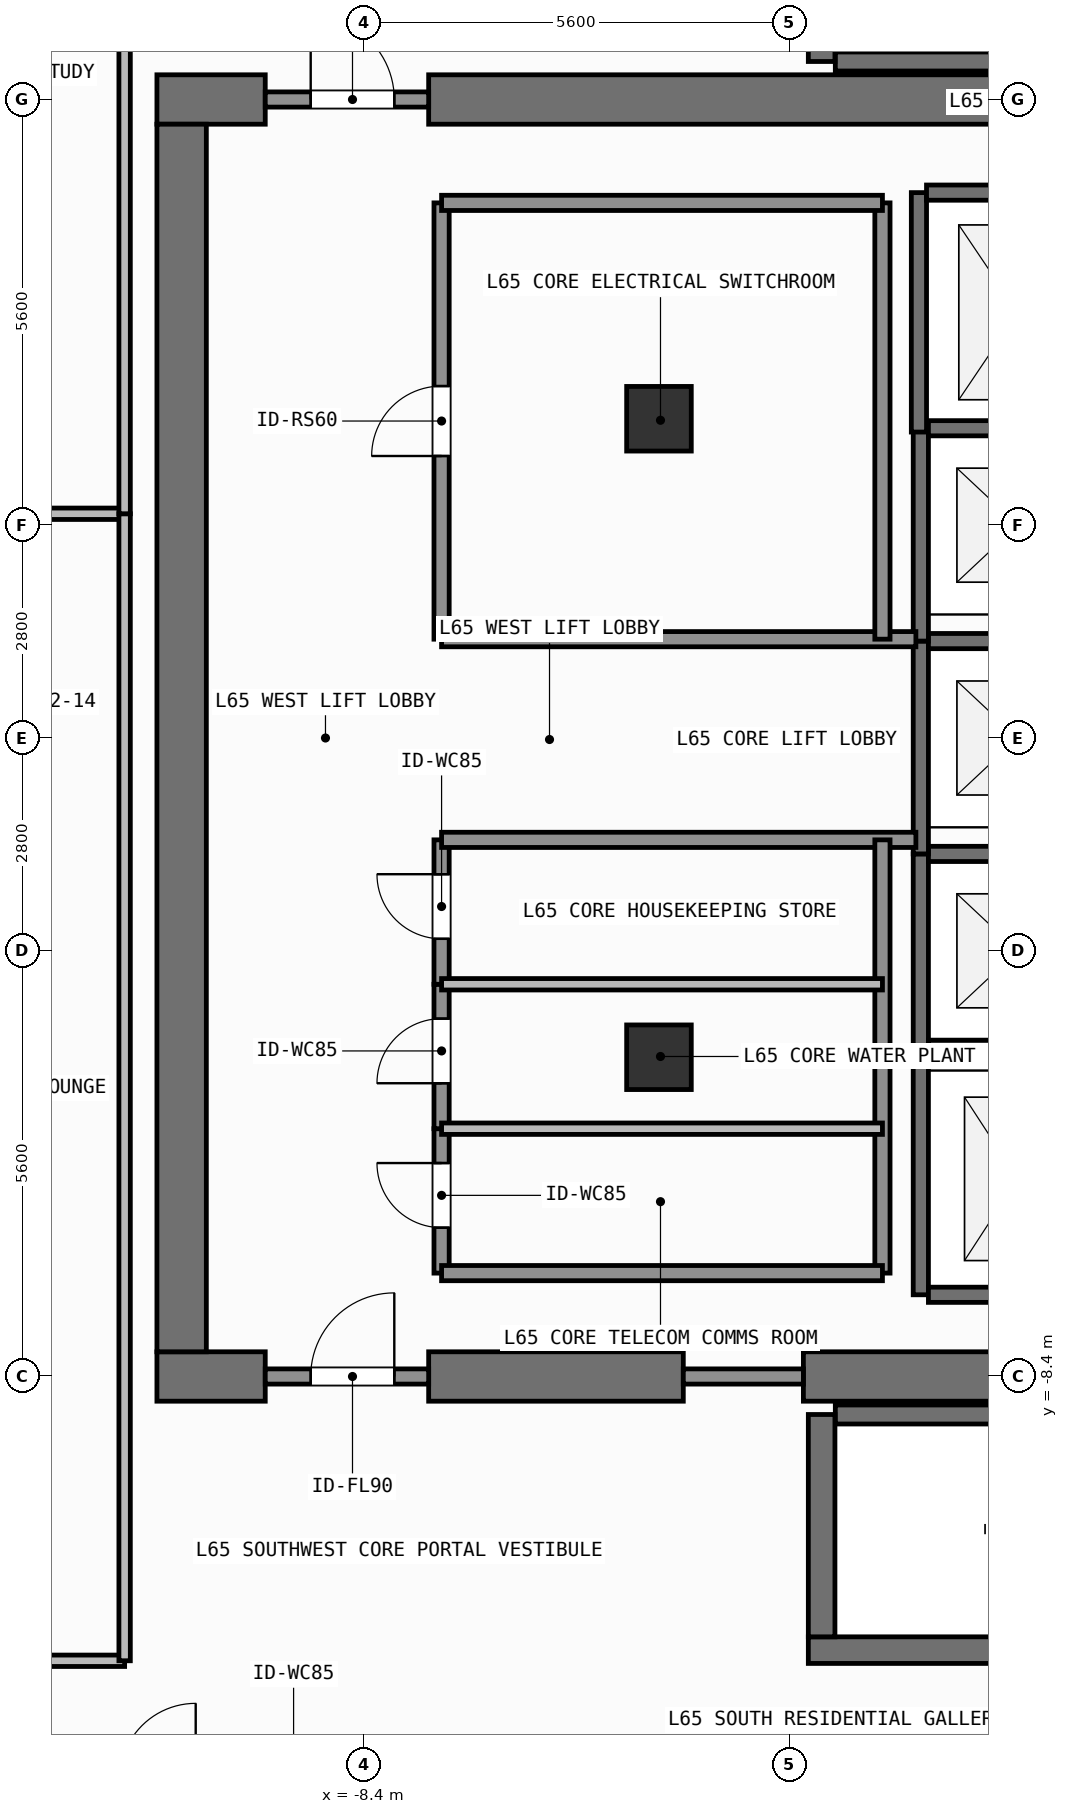
"""IFC4 building model, lengths in metres.
Left out: names, types, materials, properties, quantities, classifications, styles, units other than length and angle.
Written with IfcOpenShell. Run it as: python <this file> out.ifc"""

import sys

from ifc_helpers import new_model, si_unit, direction, frame, frame_2d, origin, origin_2d, place, context, subcontext, project, spatial, rectangle, extrude, element, fill, save


model = new_model("IFC4")
c1 = context("Model", 3, precision=1e-05, world=origin(), true_north=direction((0.0, 1.0)))
c2 = subcontext(c1, "Body", "Model", "MODEL_VIEW")
j1 = project(units=[si_unit("LENGTHUNIT", "METRE"), si_unit("PLANEANGLEUNIT", "RADIAN")], contexts=[c1])
p1 = place(None, origin())
s1 = spatial("IfcSite", under=j1, at=p1, CompositionType="ELEMENT")
p2 = place(p1, origin())
s2 = spatial("IfcBuilding", under=s1, at=p2, CompositionType="ELEMENT")
p3 = place(p2, frame((0.0, 0.0, 266.4)))
s3 = spatial("IfcBuildingStorey", under=s2, at=p3, CompositionType="ELEMENT", Elevation=266.4)
p4 = place(p3, frame((-11.125, -8.4, 0.0), z_axis=(0.0, 0.0, 1.0), x_axis=(1.0, 0.0, 0.0)))
e1 = element("IfcWall", 1, at=p4, inside=s3, PredefinedType="SHEAR", context=c2, shape_type="SweptSolid", body=[
    extrude(rectangle(XDim=1.425, YDim=0.65, at=frame_2d((0.712, 0.0))), origin(), (0.0, 0.0, 1.0), 3.9),
])
p5 = place(p3, frame((-7.55, -8.4, 0.0), z_axis=(0.0, 0.0, 1.0), x_axis=(1.0, 0.0, 0.0)))
e2 = element("IfcWall", 2, at=p5, inside=s3, PredefinedType="SHEAR", context=c2, shape_type="SweptSolid", body=[
    extrude(rectangle(XDim=3.35, YDim=0.65, at=frame_2d((1.675, 0.0))), origin(), (0.0, 0.0, 1.0), 3.9),
])
p6 = place(p3, frame((-2.62, -8.4, 0.0), z_axis=(0.0, 0.0, 1.0), x_axis=(1.0, 0.0, 0.0)))
e3 = element("IfcWall", 3, at=p6, inside=s3, PredefinedType="SHEAR", context=c2, shape_type="SweptSolid", body=[
    extrude(rectangle(XDim=7.27, YDim=0.65, at=frame_2d((3.635, 0.0))), origin(), (0.0, 0.0, 1.0), 3.9),
])
p7 = place(p3, frame((-11.125, 8.4, 0.0), z_axis=(0.0, 0.0, 1.0), x_axis=(1.0, 0.0, 0.0)))
e4 = element("IfcWall", 4, at=p7, inside=s3, PredefinedType="SHEAR", context=c2, shape_type="SweptSolid", body=[
    extrude(rectangle(XDim=1.425, YDim=0.65, at=frame_2d((0.712, 0.0))), origin(), (0.0, 0.0, 1.0), 3.9),
])
p8 = place(p3, frame((-7.55, 8.4, 0.0), z_axis=(0.0, 0.0, 1.0), x_axis=(1.0, 0.0, 0.0)))
e5 = element("IfcWall", 5, at=p8, inside=s3, PredefinedType="SHEAR", context=c2, shape_type="SweptSolid", body=[
    extrude(rectangle(XDim=16.275, YDim=0.65, at=frame_2d((8.138, 0.0))), origin(), (0.0, 0.0, 1.0), 3.9),
])
p9 = place(p3, frame((-10.8, -8.075, 0.0), z_axis=(0.0, 0.0, 1.0), x_axis=(0.0, 1.0, 0.0)))
e6 = element("IfcWall", 6, at=p9, inside=s3, PredefinedType="SHEAR", context=c2, shape_type="SweptSolid", body=[
    extrude(rectangle(XDim=16.15, YDim=0.65, at=frame_2d((8.075, 0.0))), origin(), (0.0, 0.0, 1.0), 3.9),
])
p10 = place(p3, frame((-2.555, -12.0, 0.0), z_axis=(0.0, 0.0, 1.0), x_axis=(1.0, 0.0, 0.0)))
e7 = element("IfcWall", 7, at=p10, inside=s3, PredefinedType="SHEAR", context=c2, shape_type="SweptSolid", body=[
    extrude(rectangle(XDim=7.31, YDim=0.35, at=frame_2d((3.655, 0.0))), origin(), (0.0, 0.0, 1.0), 3.9),
])
p11 = place(p3, frame((-2.2, -8.9, 0.0), z_axis=(0.0, 0.0, 1.0), x_axis=(1.0, 0.0, 0.0)))
e8 = element("IfcWall", 8, at=p11, inside=s3, PredefinedType="SHEAR", context=c2, shape_type="SweptSolid", body=[
    extrude(rectangle(XDim=6.6, YDim=0.25, at=frame_2d((3.3, 0.0))), origin(), (0.0, 0.0, 1.0), 3.9),
])
p12 = place(p3, frame((-2.38, -11.825, 0.0), z_axis=(0.0, 0.0, 1.0), x_axis=(0.0, 1.0, 0.0)))
e9 = element("IfcWall", 9, at=p12, inside=s3, PredefinedType="SHEAR", context=c2, shape_type="SweptSolid", body=[
    extrude(rectangle(XDim=2.925, YDim=0.35, at=frame_2d((1.462, 0.0))), origin(), (0.0, 0.0, 1.0), 3.9),
])
p13 = place(p3, frame((-2.2, 8.9, 0.0), z_axis=(0.0, 0.0, 1.0), x_axis=(1.0, 0.0, 0.0)))
e10 = element("IfcWall", 10, at=p13, inside=s3, PredefinedType="SHEAR", context=c2, shape_type="SweptSolid", body=[
    extrude(rectangle(XDim=6.6, YDim=0.25, at=frame_2d((3.3, 0.0))), origin(), (0.0, 0.0, 1.0), 3.9),
])
p14 = place(p3, frame((-2.38, 8.9, 0.0), z_axis=(0.0, 0.0, 1.0), x_axis=(0.0, 1.0, 0.0)))
e11 = element("IfcWall", 11, at=p14, inside=s3, PredefinedType="SHEAR", context=c2, shape_type="SweptSolid", body=[
    extrude(rectangle(XDim=2.925, YDim=0.35, at=frame_2d((1.462, 0.0))), origin(), (0.0, 0.0, 1.0), 3.9),
])
for number, where, z_axis, x_axis in (
    (12, (-4.52, -4.2, 0.0), (0.0, 0.0, 1.0), (1.0, 0.0, 0.0)),
    (13, (-4.52, 4.2, 0.0), (0.0, 0.0, 1.0), (1.0, 0.0, 0.0)),
):
    element("IfcColumn", number, at=place(p3, frame(where, z_axis=z_axis, x_axis=x_axis)), inside=s3, PredefinedType="COLUMN", context=c2, shape_type="SweptSolid", body=[
        extrude(rectangle(XDim=0.85, YDim=0.85, at=origin_2d()), origin(), (0.0, 0.0, 1.0), 3.9),
    ])
p15 = place(p3, frame((-1.075, -4.275, 0.0), z_axis=(0.0, 0.0, 1.0), x_axis=(0.0, 1.0, 0.0)))
e14 = element("IfcWall", 14, at=p15, inside=s3, PredefinedType="SHEAR", context=c2, shape_type="SweptSolid", body=[
    extrude(rectangle(XDim=2.75, YDim=0.2, at=frame_2d((1.375, 0.0))), origin(), (0.0, 0.0, 1.0), 3.68),
])
for number, where, z_axis, x_axis in (
    (15, (-0.975, -4.075, 0.0), (0.0, 0.0, 1.0), (1.0, 0.0, 0.0)),
    (16, (-0.975, -1.525, 0.0), (0.0, 0.0, 1.0), (1.0, 0.0, 0.0)),
):
    element("IfcWall", number, at=place(p3, frame(where, z_axis=z_axis, x_axis=x_axis)), inside=s3, PredefinedType="SHEAR", context=c2, shape_type="SweptSolid", body=[
        extrude(rectangle(XDim=2.35, YDim=0.2, at=frame_2d((1.175, 0.0))), origin(), (0.0, 0.0, 1.0), 3.68),
    ])
p16 = place(p3, frame((-1.075, -1.525, 0.0), z_axis=(0.0, 0.0, 1.0), x_axis=(0.0, 1.0, 0.0)))
e17 = element("IfcWall", 17, at=p16, inside=s3, PredefinedType="SHEAR", context=c2, shape_type="SweptSolid", body=[
    extrude(rectangle(XDim=2.8, YDim=0.2, at=frame_2d((1.4, 0.0))), origin(), (0.0, 0.0, 1.0), 3.68),
])
p17 = place(p3, frame((-0.975, 1.275, 0.0), z_axis=(0.0, 0.0, 1.0), x_axis=(1.0, 0.0, 0.0)))
e18 = element("IfcWall", 18, at=p17, inside=s3, PredefinedType="SHEAR", context=c2, shape_type="SweptSolid", body=[
    extrude(rectangle(XDim=2.35, YDim=0.2, at=frame_2d((1.175, 0.0))), origin(), (0.0, 0.0, 1.0), 3.68),
])
p18 = place(p3, frame((-1.075, 1.275, 0.0), z_axis=(0.0, 0.0, 1.0), x_axis=(0.0, 1.0, 0.0)))
e19 = element("IfcWall", 19, at=p18, inside=s3, PredefinedType="SHEAR", context=c2, shape_type="SweptSolid", body=[
    extrude(rectangle(XDim=2.8, YDim=0.2, at=frame_2d((1.4, 0.0))), origin(), (0.0, 0.0, 1.0), 3.68),
])
p19 = place(p3, frame((-0.975, 4.075, 0.0), z_axis=(0.0, 0.0, 1.0), x_axis=(1.0, 0.0, 0.0)))
e20 = element("IfcWall", 20, at=p19, inside=s3, PredefinedType="SHEAR", context=c2, shape_type="SweptSolid", body=[
    extrude(rectangle(XDim=2.35, YDim=0.2, at=frame_2d((1.175, 0.0))), origin(), (0.0, 0.0, 1.0), 3.68),
])
p20 = place(p3, frame((-1.1, 4.025, 0.0), z_axis=(0.0, 0.0, 1.0), x_axis=(0.0, 1.0, 0.0)))
e21 = element("IfcWall", 21, at=p20, inside=s3, PredefinedType="SHEAR", context=c2, shape_type="SweptSolid", body=[
    extrude(rectangle(XDim=3.15, YDim=0.2, at=frame_2d((1.575, 0.0))), origin(), (0.0, 0.0, 1.0), 3.68),
])
p21 = place(p3, frame((-1.0, 7.175, 0.0), z_axis=(0.0, 0.0, 1.0), x_axis=(1.0, 0.0, 0.0)))
e22 = element("IfcWall", 22, at=p21, inside=s3, PredefinedType="SHEAR", context=c2, shape_type="SweptSolid", body=[
    extrude(rectangle(XDim=2.4, YDim=0.2, at=frame_2d((1.2, 0.0))), origin(), (0.0, 0.0, 1.0), 3.68),
])
p22 = place(p3, frame((-1.075, -7.325, 0.0), z_axis=(0.0, 0.0, 1.0), x_axis=(0.0, 1.0, 0.0)))
e23 = element("IfcWall", 23, at=p22, inside=s3, PredefinedType="SHEAR", context=c2, shape_type="SweptSolid", body=[
    extrude(rectangle(XDim=3.05, YDim=0.2, at=frame_2d((1.525, 0.0))), origin(), (0.0, 0.0, 1.0), 3.68),
])
p23 = place(p3, frame((-0.975, -7.325, 0.0), z_axis=(0.0, 0.0, 1.0), x_axis=(1.0, 0.0, 0.0)))
e24 = element("IfcWall", 24, at=p23, inside=s3, PredefinedType="SHEAR", context=c2, shape_type="SweptSolid", body=[
    extrude(rectangle(XDim=2.35, YDim=0.2, at=frame_2d((1.175, 0.0))), origin(), (0.0, 0.0, 1.0), 3.68),
])
p24 = place(p3, frame((-9.7, -8.4, 0.0), z_axis=(0.0, 0.0, 1.0), x_axis=(1.0, 0.0, 0.0)))
e25 = element("IfcWall", 25, at=p24, inside=s3, PredefinedType="SOLIDWALL", context=c2, shape_type="SweptSolid", body=[
    extrude(rectangle(XDim=2.15, YDim=0.2, at=frame_2d((1.075, 0.0))), origin(), (0.0, 0.0, 1.0), 2.92),
])
p25 = place(p24, frame((0.598, 0.0, 0.0)))
e26 = element("IfcOpeningElement", 26, at=p25, cuts=e25, PredefinedType="OPENING", context=c2, shape_type="SweptSolid", body=[
    extrude(rectangle(XDim=1.1, YDim=2.15, at=frame_2d((0.55, 1.075))), frame((0.0, 0.11, 0.0), z_axis=(0.0, -1.0, 0.0), x_axis=(1.0, 0.0, 0.0)), (0.0, 0.0, 1.0), 0.22),
])
p26 = place(p3, frame((-9.7, 8.4, 0.0), z_axis=(0.0, 0.0, 1.0), x_axis=(1.0, 0.0, 0.0)))
e27 = element("IfcWall", 27, at=p26, inside=s3, PredefinedType="SOLIDWALL", context=c2, shape_type="SweptSolid", body=[
    extrude(rectangle(XDim=2.15, YDim=0.2, at=frame_2d((1.075, 0.0))), origin(), (0.0, 0.0, 1.0), 2.92),
])
p27 = place(p26, frame((0.598, 0.0, 0.0)))
e28 = element("IfcOpeningElement", 28, at=p27, cuts=e27, PredefinedType="OPENING", context=c2, shape_type="SweptSolid", body=[
    extrude(rectangle(XDim=1.1, YDim=2.15, at=frame_2d((0.55, 1.075))), frame((0.0, 0.11, 0.0), z_axis=(0.0, -1.0, 0.0), x_axis=(1.0, 0.0, 0.0)), (0.0, 0.0, 1.0), 0.22),
])
p28 = place(p3, frame((-7.38, -7.04, 0.0), z_axis=(0.0, 0.0, 1.0), x_axis=(0.0, 1.0, 0.0)))
e29 = element("IfcWall", 29, at=p28, inside=s3, PredefinedType="SOLIDWALL", context=c2, shape_type="SweptSolid", body=[
    extrude(rectangle(XDim=1.9, YDim=0.2, at=frame_2d((0.95, 0.0))), origin(), (0.0, 0.0, 1.0), 3.68),
])
p29 = place(p28, frame((0.598, 0.0, 0.0)))
e30 = element("IfcOpeningElement", 30, at=p29, cuts=e29, PredefinedType="OPENING", context=c2, shape_type="SweptSolid", body=[
    extrude(rectangle(XDim=0.85, YDim=2.1, at=frame_2d((0.425, 1.05))), frame((0.0, 0.11, 0.0), z_axis=(0.0, -1.0, 0.0), x_axis=(1.0, 0.0, 0.0)), (0.0, 0.0, 1.0), 0.22),
])
p30 = place(p3, frame((-7.38, -5.14, 0.0), z_axis=(0.0, 0.0, 1.0), x_axis=(0.0, 1.0, 0.0)))
e31 = element("IfcWall", 31, at=p30, inside=s3, PredefinedType="SOLIDWALL", context=c2, shape_type="SweptSolid", body=[
    extrude(rectangle(XDim=1.9, YDim=0.2, at=frame_2d((0.95, 0.0))), origin(), (0.0, 0.0, 1.0), 3.68),
])
p31 = place(p30, frame((0.598, 0.0, 0.0)))
e32 = element("IfcOpeningElement", 32, at=p31, cuts=e31, PredefinedType="OPENING", context=c2, shape_type="SweptSolid", body=[
    extrude(rectangle(XDim=0.85, YDim=2.1, at=frame_2d((0.425, 1.05))), frame((0.0, 0.11, 0.0), z_axis=(0.0, -1.0, 0.0), x_axis=(1.0, 0.0, 0.0)), (0.0, 0.0, 1.0), 0.22),
])
p32 = place(p3, frame((-7.38, -3.24, 0.0), z_axis=(0.0, 0.0, 1.0), x_axis=(0.0, 1.0, 0.0)))
e33 = element("IfcWall", 33, at=p32, inside=s3, PredefinedType="SOLIDWALL", context=c2, shape_type="SweptSolid", body=[
    extrude(rectangle(XDim=1.9, YDim=0.2, at=frame_2d((0.95, 0.0))), origin(), (0.0, 0.0, 1.0), 3.68),
])
p33 = place(p32, frame((0.598, 0.0, 0.0)))
e34 = element("IfcOpeningElement", 34, at=p33, cuts=e33, PredefinedType="OPENING", context=c2, shape_type="SweptSolid", body=[
    extrude(rectangle(XDim=0.85, YDim=2.1, at=frame_2d((0.425, 1.05))), frame((0.0, 0.11, 0.0), z_axis=(0.0, -1.0, 0.0), x_axis=(1.0, 0.0, 0.0)), (0.0, 0.0, 1.0), 0.22),
])
p34 = place(p3, frame((-7.38, 1.3, 0.0), z_axis=(0.0, 0.0, 1.0), x_axis=(0.0, 1.0, 0.0)))
e35 = element("IfcWall", 35, at=p34, inside=s3, PredefinedType="SOLIDWALL", context=c2, shape_type="SweptSolid", body=[
    extrude(rectangle(XDim=5.74, YDim=0.2, at=frame_2d((2.87, 0.0))), origin(), (0.0, 0.0, 1.0), 3.68),
])
p35 = place(p34, frame((2.41, 0.0, 0.0)))
e36 = element("IfcOpeningElement", 36, at=p35, cuts=e35, PredefinedType="OPENING", context=c2, shape_type="SweptSolid", body=[
    extrude(rectangle(XDim=0.92, YDim=2.1, at=frame_2d((0.46, 1.05))), frame((0.0, 0.11, 0.0), z_axis=(0.0, -1.0, 0.0), x_axis=(1.0, 0.0, 0.0)), (0.0, 0.0, 1.0), 0.22),
])
p36 = place(p3, frame((-16.93, -12.14, 0.0), z_axis=(0.0, 0.0, 1.0), x_axis=(1.0, 0.0, 0.0)))
e37 = element("IfcWall", 37, at=p36, inside=s3, PredefinedType="PARTITIONING", context=c2, shape_type="SweptSolid", body=[
    extrude(rectangle(XDim=5.38, YDim=0.15, at=frame_2d((2.69, 0.0))), origin(), (0.0, 0.0, 1.0), 3.68),
])
p37 = place(p36, frame((2.24, 0.0, 0.0)))
e38 = element("IfcOpeningElement", 38, at=p37, cuts=e37, PredefinedType="OPENING", context=c2, shape_type="SweptSolid", body=[
    extrude(rectangle(XDim=0.9, YDim=2.1, at=frame_2d((0.45, 1.05))), frame((0.0, 0.085, 0.0), z_axis=(0.0, -1.0, 0.0), x_axis=(1.0, 0.0, 0.0)), (0.0, 0.0, 1.0), 0.17),
])
p38 = place(p3, frame((-4.2, -8.4, 0.0), z_axis=(0.0, 0.0, 1.0), x_axis=(1.0, 0.0, 0.0)))
e39 = element("IfcWall", 39, at=p38, inside=s3, PredefinedType="SOLIDWALL", context=c2, shape_type="SweptSolid", body=[
    extrude(rectangle(XDim=1.58, YDim=0.2, at=frame_2d((0.79, 0.0))), origin(), (0.0, 0.0, 1.0), 2.92),
])
for number, where, z_axis, x_axis in (
    (40, (-7.38, -1.34, 0.0), (0.0, 0.0, 1.0), (1.0, 0.0, 0.0)),
    (41, (-7.38, 1.3, 0.0), (0.0, 0.0, 1.0), (1.0, 0.0, 0.0)),
):
    element("IfcWall", number, at=place(p3, frame(where, z_axis=z_axis, x_axis=x_axis)), inside=s3, PredefinedType="SOLIDWALL", context=c2, shape_type="SweptSolid", body=[
        extrude(rectangle(XDim=6.24, YDim=0.2, at=frame_2d((3.12, 0.0))), origin(), (0.0, 0.0, 1.0), 3.68),
    ])
p39 = place(p3, frame((-1.58, -7.04, 0.0), z_axis=(0.0, 0.0, 1.0), x_axis=(0.0, 1.0, 0.0)))
e42 = element("IfcWall", 42, at=p39, inside=s3, PredefinedType="SOLIDWALL", context=c2, shape_type="SweptSolid", body=[
    extrude(rectangle(XDim=5.7, YDim=0.2, at=frame_2d((2.85, 0.0))), origin(), (0.0, 0.0, 1.0), 3.68),
])
p40 = place(p3, frame((-7.38, -7.04, 0.0), z_axis=(0.0, 0.0, 1.0), x_axis=(1.0, 0.0, 0.0)))
e43 = element("IfcWall", 43, at=p40, inside=s3, PredefinedType="SOLIDWALL", context=c2, shape_type="SweptSolid", body=[
    extrude(rectangle(XDim=5.8, YDim=0.2, at=frame_2d((2.9, 0.0))), origin(), (0.0, 0.0, 1.0), 3.68),
])
p41 = place(p3, frame((-1.58, 1.3, 0.0), z_axis=(0.0, 0.0, 1.0), x_axis=(0.0, 1.0, 0.0)))
e44 = element("IfcWall", 44, at=p41, inside=s3, PredefinedType="SOLIDWALL", context=c2, shape_type="SweptSolid", body=[
    extrude(rectangle(XDim=5.74, YDim=0.2, at=frame_2d((2.87, 0.0))), origin(), (0.0, 0.0, 1.0), 3.68),
])
p42 = place(p3, frame((-7.38, 7.04, 0.0), z_axis=(0.0, 0.0, 1.0), x_axis=(1.0, 0.0, 0.0)))
e45 = element("IfcWall", 45, at=p42, inside=s3, PredefinedType="SOLIDWALL", context=c2, shape_type="SweptSolid", body=[
    extrude(rectangle(XDim=5.8, YDim=0.2, at=frame_2d((2.9, 0.0))), origin(), (0.0, 0.0, 1.0), 3.68),
])
for number, where, z_axis, x_axis in (
    (46, (-7.38, -5.14, 0.0), (0.0, 0.0, 1.0), (1.0, 0.0, 0.0)),
    (47, (-7.38, -3.24, 0.0), (0.0, 0.0, 1.0), (1.0, 0.0, 0.0)),
):
    element("IfcWall", number, at=place(p3, frame(where, z_axis=z_axis, x_axis=x_axis)), inside=s3, PredefinedType="PARTITIONING", context=c2, shape_type="SweptSolid", body=[
        extrude(rectangle(XDim=5.8, YDim=0.15, at=frame_2d((2.9, 0.0))), origin(), (0.0, 0.0, 1.0), 3.68),
    ])
p43 = place(p3, frame((-16.93, 2.95, 0.0), z_axis=(0.0, 0.0, 1.0), x_axis=(1.0, 0.0, 0.0)))
e48 = element("IfcWall", 48, at=p43, inside=s3, PredefinedType="PARTITIONING", context=c2, shape_type="SweptSolid", body=[
    extrude(rectangle(XDim=5.38, YDim=0.15, at=frame_2d((2.69, 0.0))), origin(), (0.0, 0.0, 1.0), 3.68),
])
p44 = place(p3, frame((-11.55, -12.14, 0.0), z_axis=(0.0, 0.0, 1.0), x_axis=(0.0, 1.0, 0.0)))
e49 = element("IfcWall", 49, at=p44, inside=s3, PredefinedType="PARTITIONING", context=c2, shape_type="SweptSolid", body=[
    extrude(rectangle(XDim=15.09, YDim=0.15, at=frame_2d((7.545, 0.0))), origin(), (0.0, 0.0, 1.0), 3.68),
])
p45 = place(p3, frame((-11.55, 2.95, 0.0), z_axis=(0.0, 0.0, 1.0), x_axis=(0.0, 1.0, 0.0)))
e50 = element("IfcWall", 50, at=p45, inside=s3, PredefinedType="PARTITIONING", context=c2, shape_type="SweptSolid", body=[
    extrude(rectangle(XDim=9.19, YDim=0.15, at=frame_2d((4.595, 0.0))), origin(), (0.0, 0.0, 1.0), 3.68),
])
p46 = place(p25, origin())
e51 = element("IfcDoor", 51, at=p46, inside=s3, OperationType="SINGLE_SWING_RIGHT", PredefinedType="DOOR", context=c2, shape_type="SweptSolid", body=[
    extrude(rectangle(XDim=1.1, YDim=2.15, at=frame_2d((0.55, 1.075))), frame((0.0, 0.025, 0.0), z_axis=(0.0, -1.0, 0.0), x_axis=(1.0, 0.0, 0.0)), (0.0, 0.0, 1.0), 0.05),
])
fill(e26, e51)
p47 = place(p27, origin())
e52 = element("IfcDoor", 52, at=p47, inside=s3, OperationType="SINGLE_SWING_LEFT", PredefinedType="DOOR", context=c2, shape_type="SweptSolid", body=[
    extrude(rectangle(XDim=1.1, YDim=2.15, at=frame_2d((0.55, 1.075))), frame((0.0, 0.025, 0.0), z_axis=(0.0, -1.0, 0.0), x_axis=(1.0, 0.0, 0.0)), (0.0, 0.0, 1.0), 0.05),
])
fill(e28, e52)
p48 = place(p29, origin())
e53 = element("IfcDoor", 53, at=p48, inside=s3, OperationType="SINGLE_SWING_RIGHT", PredefinedType="DOOR", context=c2, shape_type="SweptSolid", body=[
    extrude(rectangle(XDim=0.85, YDim=2.1, at=frame_2d((0.425, 1.05))), frame((0.0, 0.025, 0.0), z_axis=(0.0, -1.0, 0.0), x_axis=(1.0, 0.0, 0.0)), (0.0, 0.0, 1.0), 0.05),
])
fill(e30, e53)
p49 = place(p31, origin())
e54 = element("IfcDoor", 54, at=p49, inside=s3, OperationType="SINGLE_SWING_LEFT", PredefinedType="DOOR", context=c2, shape_type="SweptSolid", body=[
    extrude(rectangle(XDim=0.85, YDim=2.1, at=frame_2d((0.425, 1.05))), frame((0.0, 0.025, 0.0), z_axis=(0.0, -1.0, 0.0), x_axis=(1.0, 0.0, 0.0)), (0.0, 0.0, 1.0), 0.05),
])
fill(e32, e54)
p50 = place(p33, origin())
e55 = element("IfcDoor", 55, at=p50, inside=s3, OperationType="SINGLE_SWING_RIGHT", PredefinedType="DOOR", context=c2, shape_type="SweptSolid", body=[
    extrude(rectangle(XDim=0.85, YDim=2.1, at=frame_2d((0.425, 1.05))), frame((0.0, 0.025, 0.0), z_axis=(0.0, -1.0, 0.0), x_axis=(1.0, 0.0, 0.0)), (0.0, 0.0, 1.0), 0.05),
])
fill(e34, e55)
p51 = place(p35, origin())
e56 = element("IfcDoor", 56, at=p51, inside=s3, OperationType="SINGLE_SWING_LEFT", PredefinedType="DOOR", context=c2, shape_type="SweptSolid", body=[
    extrude(rectangle(XDim=0.92, YDim=2.1, at=frame_2d((0.46, 1.05))), frame((0.0, 0.025, 0.0), z_axis=(0.0, -1.0, 0.0), x_axis=(1.0, 0.0, 0.0)), (0.0, 0.0, 1.0), 0.05),
])
fill(e36, e56)
save(model, sys.argv[1])
